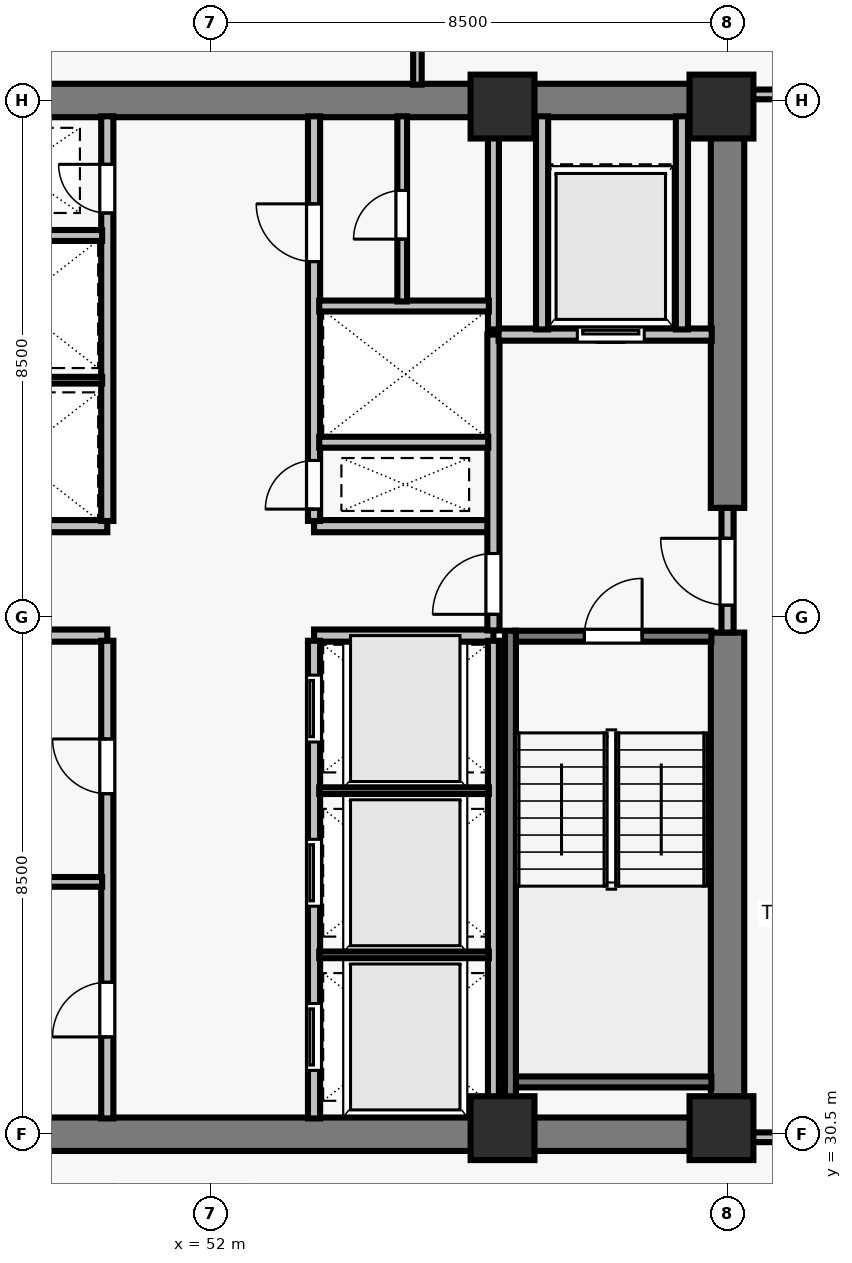
"""IFC4 building model, lengths in metres.
Left out: names, types, materials, properties, quantities, classifications, styles, units other than length and angle.
Written with IfcOpenShell. Run it as: python <this file> out.ifc"""

import sys

from ifc_helpers import new_model, si_unit, direction, frame, frame_2d, origin, origin_2d, place, context, subcontext, project, spatial, rectangle, extrude, element, fill, save


model = new_model("IFC4")
c1 = context("Model", 3, precision=1e-05, world=origin(), true_north=direction((0.0, 1.0)))
c2 = subcontext(c1, "Body", "Model", "MODEL_VIEW")
j1 = project(units=[si_unit("LENGTHUNIT", "METRE"), si_unit("PLANEANGLEUNIT", "RADIAN")], contexts=[c1])
p1 = place(None, origin())
s1 = spatial("IfcSite", under=j1, at=p1, CompositionType="ELEMENT")
p2 = place(p1, origin())
s2 = spatial("IfcBuilding", under=s1, at=p2, CompositionType="ELEMENT")
p3 = place(p2, frame((0.0, 0.0, 169.0)))
s3 = spatial("IfcBuildingStorey", under=s2, at=p3, CompositionType="ELEMENT", Elevation=169.0)
for number, where, z_axis, x_axis in (
    (1, (56.8, 30.6, 0.0), (0.0, 0.0, 1.0), (1.0, 0.0, 0.0)),
    (2, (60.4, 30.6, 0.0), (0.0, 0.0, 1.0), (1.0, 0.0, 0.0)),
    (3, (56.8, 47.4, 0.0), (0.0, 0.0, 1.0), (1.0, 0.0, 0.0)),
    (4, (60.4, 47.4, 0.0), (0.0, 0.0, 1.0), (1.0, 0.0, 0.0)),
):
    element("IfcColumn", number, at=place(p3, frame(where, z_axis=z_axis, x_axis=x_axis)), inside=s3, PredefinedType="COLUMN", context=c2, shape_type="SweptSolid", body=[
        extrude(rectangle(XDim=1.05, YDim=1.05, at=origin_2d()), origin(), (0.0, 0.0, 1.0), 3.5),
    ])
for number, where, z_axis, x_axis in (
    (5, (43.225, 30.5, 0.0), (0.0, 0.0, 1.0), (1.0, 0.0, 0.0)),
    (6, (43.225, 47.5, 0.0), (0.0, 0.0, 1.0), (1.0, 0.0, 0.0)),
):
    element("IfcWall", number, at=place(p3, frame(where, z_axis=z_axis, x_axis=x_axis)), inside=s3, PredefinedType="SHEAR", context=c2, shape_type="SweptSolid", body=[
        extrude(rectangle(XDim=17.55, YDim=0.55, at=frame_2d((8.775, 0.0))), origin(), (0.0, 0.0, 1.0), 3.28),
    ])
p4 = place(p3, frame((60.5, 30.765, 0.0), z_axis=(0.0, 0.0, 1.0), x_axis=(0.0, 1.0, 0.0)))
e7 = element("IfcWall", 7, at=p4, inside=s3, PredefinedType="SHEAR", context=c2, shape_type="SweptSolid", body=[
    extrude(rectangle(XDim=7.985, YDim=0.55, at=frame_2d((3.993, 0.0))), origin(), (0.0, 0.0, 1.0), 3.28),
])
p5 = place(p3, frame((60.5, 40.8, 0.0), z_axis=(0.0, 0.0, 1.0), x_axis=(0.0, 1.0, 0.0)))
e8 = element("IfcWall", 8, at=p5, inside=s3, PredefinedType="SHEAR", context=c2, shape_type="SweptSolid", body=[
    extrude(rectangle(XDim=6.435, YDim=0.55, at=frame_2d((3.218, 0.0))), origin(), (0.0, 0.0, 1.0), 3.28),
])
for number, where, z_axis, x_axis in (
    (9, (47.35, 38.7, 0.0), (0.0, 0.0, 1.0), (1.0, 0.0, 0.0)),
    (10, (47.35, 40.5, 0.0), (0.0, 0.0, 1.0), (1.0, 0.0, 0.0)),
    (11, (53.7, 38.7, 0.0), (0.0, 0.0, 1.0), (1.0, 0.0, 0.0)),
    (12, (53.7, 40.5, 0.0), (0.0, 0.0, 1.0), (1.0, 0.0, 0.0)),
):
    element("IfcWall", number, at=place(p3, frame(where, z_axis=z_axis, x_axis=x_axis)), inside=s3, PredefinedType="SOLIDWALL", context=c2, shape_type="SweptSolid", body=[
        extrude(rectangle(XDim=2.95, YDim=0.2, at=frame_2d((1.475, 0.0))), origin(), (0.0, 0.0, 1.0), 3.28),
    ])
p6 = place(p3, frame((50.3, 30.76, 0.0), z_axis=(0.0, 0.0, 1.0), x_axis=(0.0, 1.0, 0.0)))
e13 = element("IfcWall", 13, at=p6, inside=s3, PredefinedType="SOLIDWALL", context=c2, shape_type="SweptSolid", body=[
    extrude(rectangle(XDim=7.855, YDim=0.2, at=frame_2d((3.927, 0.0))), origin(), (0.0, 0.0, 1.0), 3.28),
])
p7 = place(p6, frame((1.34, 0.0, 0.0)))
e14 = element("IfcOpeningElement", 14, at=p7, cuts=e13, PredefinedType="OPENING", context=c2, shape_type="SweptSolid", body=[
    extrude(rectangle(XDim=0.9, YDim=2.12, at=frame_2d((0.45, 1.06))), frame((0.0, 0.11, 0.0), z_axis=(0.0, -1.0, 0.0), x_axis=(1.0, 0.0, 0.0)), (0.0, 0.0, 1.0), 0.22),
])
p8 = place(p6, frame((5.34, 0.0, 0.0)))
e15 = element("IfcOpeningElement", 15, at=p8, cuts=e13, PredefinedType="OPENING", context=c2, shape_type="SweptSolid", body=[
    extrude(rectangle(XDim=0.9, YDim=2.12, at=frame_2d((0.45, 1.06))), frame((0.0, 0.11, 0.0), z_axis=(0.0, -1.0, 0.0), x_axis=(1.0, 0.0, 0.0)), (0.0, 0.0, 1.0), 0.22),
])
p9 = place(p3, frame((53.7, 30.76, 0.0), z_axis=(0.0, 0.0, 1.0), x_axis=(0.0, 1.0, 0.0)))
e16 = element("IfcWall", 16, at=p9, inside=s3, PredefinedType="SOLIDWALL", context=c2, shape_type="SweptSolid", body=[
    extrude(rectangle(XDim=7.855, YDim=0.2, at=frame_2d((3.927, 0.0))), origin(), (0.0, 0.0, 1.0), 3.28),
])
p10 = place(p9, frame((0.79, 0.0, 0.0)))
e17 = element("IfcOpeningElement", 17, at=p10, cuts=e16, PredefinedType="OPENING", context=c2, shape_type="SweptSolid", body=[
    extrude(rectangle(XDim=1.1, YDim=2.2, at=frame_2d((0.55, 1.1))), frame((0.0, 0.11, 0.0), z_axis=(0.0, -1.0, 0.0), x_axis=(1.0, 0.0, 0.0)), (0.0, 0.0, 1.0), 0.22),
])
p11 = place(p9, frame((3.49, 0.0, 0.0)))
e18 = element("IfcOpeningElement", 18, at=p11, cuts=e16, PredefinedType="OPENING", context=c2, shape_type="SweptSolid", body=[
    extrude(rectangle(XDim=1.1, YDim=2.2, at=frame_2d((0.55, 1.1))), frame((0.0, 0.11, 0.0), z_axis=(0.0, -1.0, 0.0), x_axis=(1.0, 0.0, 0.0)), (0.0, 0.0, 1.0), 0.22),
])
p12 = place(p9, frame((6.19, 0.0, 0.0)))
e19 = element("IfcOpeningElement", 19, at=p12, cuts=e16, PredefinedType="OPENING", context=c2, shape_type="SweptSolid", body=[
    extrude(rectangle(XDim=1.1, YDim=2.2, at=frame_2d((0.55, 1.1))), frame((0.0, 0.11, 0.0), z_axis=(0.0, -1.0, 0.0), x_axis=(1.0, 0.0, 0.0)), (0.0, 0.0, 1.0), 0.22),
])
p13 = place(p3, frame((50.3, 40.585, 0.0), z_axis=(0.0, 0.0, 1.0), x_axis=(0.0, 1.0, 0.0)))
e20 = element("IfcWall", 20, at=p13, inside=s3, PredefinedType="SOLIDWALL", context=c2, shape_type="SweptSolid", body=[
    extrude(rectangle(XDim=6.655, YDim=0.2, at=frame_2d((3.328, 0.0))), origin(), (0.0, 0.0, 1.0), 3.28),
])
p14 = place(p13, frame((5.065, 0.0, 0.0)))
e21 = element("IfcOpeningElement", 21, at=p14, cuts=e20, PredefinedType="OPENING", context=c2, shape_type="SweptSolid", body=[
    extrude(rectangle(XDim=0.8, YDim=2.08, at=frame_2d((0.4, 1.04))), frame((0.0, 0.11, 0.0), z_axis=(0.0, -1.0, 0.0), x_axis=(1.0, 0.0, 0.0)), (0.0, 0.0, 1.0), 0.22),
])
p15 = place(p3, frame((53.7, 40.585, 0.0), z_axis=(0.0, 0.0, 1.0), x_axis=(0.0, 1.0, 0.0)))
e22 = element("IfcWall", 22, at=p15, inside=s3, PredefinedType="SOLIDWALL", context=c2, shape_type="SweptSolid", body=[
    extrude(rectangle(XDim=6.655, YDim=0.2, at=frame_2d((3.328, 0.0))), origin(), (0.0, 0.0, 1.0), 3.28),
])
p16 = place(p15, frame((0.195, 0.0, 0.0)))
e23 = element("IfcOpeningElement", 23, at=p16, cuts=e22, PredefinedType="OPENING", context=c2, shape_type="SweptSolid", body=[
    extrude(rectangle(XDim=0.8, YDim=2.08, at=frame_2d((0.4, 1.04))), frame((0.0, 0.11, 0.0), z_axis=(0.0, -1.0, 0.0), x_axis=(1.0, 0.0, 0.0)), (0.0, 0.0, 1.0), 0.22),
])
p17 = place(p15, frame((4.265, 0.0, 0.0)))
e24 = element("IfcOpeningElement", 24, at=p17, cuts=e22, PredefinedType="OPENING", context=c2, shape_type="SweptSolid", body=[
    extrude(rectangle(XDim=0.95, YDim=2.12, at=frame_2d((0.475, 1.06))), frame((0.0, 0.11, 0.0), z_axis=(0.0, -1.0, 0.0), x_axis=(1.0, 0.0, 0.0)), (0.0, 0.0, 1.0), 0.22),
])
p18 = place(p3, frame((60.5, 38.75, 0.0), z_axis=(0.0, 0.0, 1.0), x_axis=(0.0, 1.0, 0.0)))
e25 = element("IfcWall", 25, at=p18, inside=s3, PredefinedType="SOLIDWALL", context=c2, shape_type="SweptSolid", body=[
    extrude(rectangle(XDim=2.05, YDim=0.2, at=frame_2d((1.025, 0.0))), origin(), (0.0, 0.0, 1.0), 3.28),
])
p19 = place(p18, frame((0.45, 0.0, 0.0)))
e26 = element("IfcOpeningElement", 26, at=p19, cuts=e25, PredefinedType="OPENING", context=c2, shape_type="SweptSolid", body=[
    extrude(rectangle(XDim=1.1, YDim=2.15, at=frame_2d((0.55, 1.075))), frame((0.0, 0.11, 0.0), z_axis=(0.0, -1.0, 0.0), x_axis=(1.0, 0.0, 0.0)), (0.0, 0.0, 1.0), 0.22),
])
p20 = place(p3, frame((56.65, 38.785, 0.0), z_axis=(0.0, 0.0, 1.0), x_axis=(0.0, 1.0, 0.0)))
e27 = element("IfcWall", 27, at=p20, inside=s3, PredefinedType="SOLIDWALL", context=c2, shape_type="SweptSolid", body=[
    extrude(rectangle(XDim=4.865, YDim=0.2, at=frame_2d((2.433, 0.0))), origin(), (0.0, 0.0, 1.0), 3.28),
])
p21 = place(p20, frame((0.265, 0.0, 0.0)))
e28 = element("IfcOpeningElement", 28, at=p21, cuts=e27, PredefinedType="OPENING", context=c2, shape_type="SweptSolid", body=[
    extrude(rectangle(XDim=1.0, YDim=2.15, at=frame_2d((0.5, 1.075))), frame((0.0, 0.11, 0.0), z_axis=(0.0, -1.0, 0.0), x_axis=(1.0, 0.0, 0.0)), (0.0, 0.0, 1.0), 0.22),
])
p22 = place(p3, frame((56.735, 43.65, 0.0), z_axis=(0.0, 0.0, 1.0), x_axis=(1.0, 0.0, 0.0)))
e29 = element("IfcWall", 29, at=p22, inside=s3, PredefinedType="SOLIDWALL", context=c2, shape_type="SweptSolid", body=[
    extrude(rectangle(XDim=3.505, YDim=0.2, at=frame_2d((1.752, 0.0))), origin(), (0.0, 0.0, 1.0), 3.28),
])
p23 = place(p22, frame((1.295, 0.0, 0.0)))
e30 = element("IfcOpeningElement", 30, at=p23, cuts=e29, PredefinedType="OPENING", context=c2, shape_type="SweptSolid", body=[
    extrude(rectangle(XDim=1.1, YDim=2.2, at=frame_2d((0.55, 1.1))), frame((0.0, 0.11, 0.0), z_axis=(0.0, -1.0, 0.0), x_axis=(1.0, 0.0, 0.0)), (0.0, 0.0, 1.0), 0.22),
])
for number, where, z_axis, x_axis in (
    (31, (57.45, 43.735, 0.0), (0.0, 0.0, 1.0), (0.0, 1.0, 0.0)),
    (32, (59.75, 43.735, 0.0), (0.0, 0.0, 1.0), (0.0, 1.0, 0.0)),
):
    element("IfcWall", number, at=place(p3, frame(where, z_axis=z_axis, x_axis=x_axis)), inside=s3, PredefinedType="SOLIDWALL", context=c2, shape_type="SweptSolid", body=[
        extrude(rectangle(XDim=3.505, YDim=0.2, at=frame_2d((1.752, 0.0))), origin(), (0.0, 0.0, 1.0), 3.28),
    ])
p24 = place(p3, frame((47.415, 34.65, 0.0), z_axis=(0.0, 0.0, 1.0), x_axis=(1.0, 0.0, 0.0)))
e33 = element("IfcWall", 33, at=p24, inside=s3, PredefinedType="PARTITIONING", context=c2, shape_type="SweptSolid", body=[
    extrude(rectangle(XDim=2.8, YDim=0.16, at=frame_2d((1.4, 0.0))), origin(), (0.0, 0.0, 1.0), 3.28),
])
p25 = place(p3, frame((56.65, 30.76, 0.0), z_axis=(0.0, 0.0, 1.0), x_axis=(0.0, 1.0, 0.0)))
e34 = element("IfcWall", 34, at=p25, inside=s3, PredefinedType="SOLIDWALL", context=c2, shape_type="SweptSolid", body=[
    extrude(rectangle(XDim=7.855, YDim=0.18, at=frame_2d((3.927, 0.0))), origin(), (0.0, 0.0, 1.0), 3.28),
])
for number, where, z_axis, x_axis in (
    (35, (53.785, 33.45, 0.0), (0.0, 0.0, 1.0), (1.0, 0.0, 0.0)),
    (36, (53.785, 36.15, 0.0), (0.0, 0.0, 1.0), (1.0, 0.0, 0.0)),
):
    element("IfcWall", number, at=place(p3, frame(where, z_axis=z_axis, x_axis=x_axis)), inside=s3, PredefinedType="PARTITIONING", context=c2, shape_type="SweptSolid", body=[
        extrude(rectangle(XDim=2.79, YDim=0.11, at=frame_2d((1.395, 0.0))), origin(), (0.0, 0.0, 1.0), 3.28),
    ])
p26 = place(p3, frame((47.435, 42.9, 0.0), z_axis=(0.0, 0.0, 1.0), x_axis=(1.0, 0.0, 0.0)))
e37 = element("IfcWall", 37, at=p26, inside=s3, PredefinedType="PARTITIONING", context=c2, shape_type="SweptSolid", body=[
    extrude(rectangle(XDim=2.78, YDim=0.11, at=frame_2d((1.39, 0.0))), origin(), (0.0, 0.0, 1.0), 3.28),
])
p27 = place(p3, frame((47.425, 45.28, 0.0), z_axis=(0.0, 0.0, 1.0), x_axis=(1.0, 0.0, 0.0)))
e38 = element("IfcWall", 38, at=p27, inside=s3, PredefinedType="SOLIDWALL", context=c2, shape_type="SweptSolid", body=[
    extrude(rectangle(XDim=2.79, YDim=0.18, at=frame_2d((1.395, 0.0))), origin(), (0.0, 0.0, 1.0), 3.28),
])
p28 = place(p3, frame((56.65, 43.735, 0.0), z_axis=(0.0, 0.0, 1.0), x_axis=(0.0, 1.0, 0.0)))
e39 = element("IfcWall", 39, at=p28, inside=s3, PredefinedType="SOLIDWALL", context=c2, shape_type="SweptSolid", body=[
    extrude(rectangle(XDim=3.505, YDim=0.18, at=frame_2d((1.752, 0.0))), origin(), (0.0, 0.0, 1.0), 3.28),
])
p29 = place(p3, frame((53.785, 41.88, 0.0), z_axis=(0.0, 0.0, 1.0), x_axis=(1.0, 0.0, 0.0)))
e40 = element("IfcWall", 40, at=p29, inside=s3, PredefinedType="SOLIDWALL", context=c2, shape_type="SweptSolid", body=[
    extrude(rectangle(XDim=2.78, YDim=0.18, at=frame_2d((1.39, 0.0))), origin(), (0.0, 0.0, 1.0), 3.28),
])
p30 = place(p3, frame((53.785, 44.12, 0.0), z_axis=(0.0, 0.0, 1.0), x_axis=(1.0, 0.0, 0.0)))
e41 = element("IfcWall", 41, at=p30, inside=s3, PredefinedType="SOLIDWALL", context=c2, shape_type="SweptSolid", body=[
    extrude(rectangle(XDim=2.79, YDim=0.18, at=frame_2d((1.395, 0.0))), origin(), (0.0, 0.0, 1.0), 3.28),
])
p31 = place(p3, frame((55.15, 44.195, 0.0), z_axis=(0.0, 0.0, 1.0), x_axis=(0.0, 1.0, 0.0)))
e42 = element("IfcWall", 42, at=p31, inside=s3, PredefinedType="PARTITIONING", context=c2, shape_type="SweptSolid", body=[
    extrude(rectangle(XDim=3.045, YDim=0.16, at=frame_2d((1.522, 0.0))), origin(), (0.0, 0.0, 1.0), 3.28),
])
p32 = place(p31, frame((1.025, 0.0, 0.0)))
e43 = element("IfcOpeningElement", 43, at=p32, cuts=e42, PredefinedType="OPENING", context=c2, shape_type="SweptSolid", body=[
    extrude(rectangle(XDim=0.8, YDim=2.1, at=frame_2d((0.4, 1.05))), frame((0.0, 0.09, 0.0), z_axis=(0.0, -1.0, 0.0), x_axis=(1.0, 0.0, 0.0)), (0.0, 0.0, 1.0), 0.18),
])
p33 = place(p3, frame((60.765, 30.45, 0.0), z_axis=(0.0, 0.0, 1.0), x_axis=(1.0, 0.0, 0.0)))
e44 = element("IfcWall", 44, at=p33, inside=s3, PredefinedType="PARTITIONING", context=c2, shape_type="SweptSolid", body=[
    extrude(rectangle(XDim=3.235, YDim=0.16, at=frame_2d((1.618, 0.0))), origin(), (0.0, 0.0, 1.0), 3.28),
])
p34 = place(p3, frame((60.765, 47.6, 0.0), z_axis=(0.0, 0.0, 1.0), x_axis=(1.0, 0.0, 0.0)))
e45 = element("IfcWall", 45, at=p34, inside=s3, PredefinedType="PARTITIONING", context=c2, shape_type="SweptSolid", body=[
    extrude(rectangle(XDim=3.17, YDim=0.16, at=frame_2d((1.585, 0.0))), origin(), (0.0, 0.0, 1.0), 3.28),
])
p35 = place(p3, frame((55.4, 47.76, 0.0), z_axis=(0.0, 0.0, 1.0), x_axis=(0.0, 1.0, 0.0)))
e46 = element("IfcWall", 46, at=p35, inside=s3, PredefinedType="PARTITIONING", context=c2, shape_type="SweptSolid", body=[
    extrude(rectangle(XDim=14.915, YDim=0.14, at=frame_2d((7.458, 0.0))), origin(), (0.0, 0.0, 1.0), 2.896),
])
p36 = place(p3, frame((57.005, 38.69, 0.0), z_axis=(0.0, 0.0, 1.0), x_axis=(1.0, 0.0, 0.0)))
e47 = element("IfcWall", 47, at=p36, inside=s3, PredefinedType="SOLIDWALL", context=c2, shape_type="SweptSolid", body=[
    extrude(rectangle(XDim=3.23, YDim=0.18, at=frame_2d((1.615, 0.0))), origin(), (0.0, 0.0, 1.0), 3.28),
])
p37 = place(p36, frame((1.14, 0.0, 0.0)))
e48 = element("IfcOpeningElement", 48, at=p37, cuts=e47, PredefinedType="OPENING", context=c2, shape_type="SweptSolid", body=[
    extrude(rectangle(XDim=0.95, YDim=2.15, at=frame_2d((0.475, 1.075))), frame((0.0, 0.1, 0.0), z_axis=(0.0, -1.0, 0.0), x_axis=(1.0, 0.0, 0.0)), (0.0, 0.0, 1.0), 0.2),
])
p38 = place(p3, frame((57.005, 31.36, 0.0), z_axis=(0.0, 0.0, 1.0), x_axis=(1.0, 0.0, 0.0)))
e49 = element("IfcWall", 49, at=p38, inside=s3, PredefinedType="SOLIDWALL", context=c2, shape_type="SweptSolid", body=[
    extrude(rectangle(XDim=3.23, YDim=0.18, at=frame_2d((1.615, 0.0))), origin(), (0.0, 0.0, 1.0), 3.28),
])
p39 = place(p3, frame((56.93, 38.78, 0.0), z_axis=(0.0, 0.0, 1.0), x_axis=(0.0, -1.0, 0.0)))
e50 = element("IfcWall", 50, at=p39, inside=s3, PredefinedType="SOLIDWALL", context=c2, shape_type="SweptSolid", body=[
    extrude(rectangle(XDim=8.017, YDim=0.18, at=frame_2d((4.009, 0.0))), origin(), (0.0, 0.0, 1.0), 3.28),
])
p40 = place(p19, origin())
e51 = element("IfcDoor", 51, at=p40, inside=s3, OperationType="SINGLE_SWING_RIGHT", PredefinedType="DOOR", context=c2, shape_type="SweptSolid", body=[
    extrude(rectangle(XDim=1.1, YDim=2.15, at=frame_2d((0.55, 1.075))), frame((0.0, 0.025, 0.0), z_axis=(0.0, -1.0, 0.0), x_axis=(1.0, 0.0, 0.0)), (0.0, 0.0, 1.0), 0.05),
])
fill(e26, e51)
p41 = place(p21, origin())
e52 = element("IfcDoor", 52, at=p41, inside=s3, OperationType="SINGLE_SWING_LEFT", PredefinedType="DOOR", context=c2, shape_type="SweptSolid", body=[
    extrude(rectangle(XDim=1.0, YDim=2.15, at=frame_2d((0.5, 1.075))), frame((0.0, 0.025, 0.0), z_axis=(0.0, -1.0, 0.0), x_axis=(1.0, 0.0, 0.0)), (0.0, 0.0, 1.0), 0.05),
])
fill(e28, e52)
p42 = place(p23, origin())
e53 = element("IfcDoor", 53, at=p42, inside=s3, OperationType="SLIDING_TO_LEFT", PredefinedType="DOOR", context=c2, shape_type="SweptSolid", body=[
    extrude(rectangle(XDim=1.1, YDim=2.2, at=frame_2d((0.55, 1.1))), frame((0.0, 0.025, 0.0), z_axis=(0.0, -1.0, 0.0), x_axis=(1.0, 0.0, 0.0)), (0.0, 0.0, 1.0), 0.05),
])
fill(e30, e53)
p43 = place(p7, origin())
e54 = element("IfcDoor", 54, at=p43, inside=s3, OperationType="SINGLE_SWING_LEFT", PredefinedType="DOOR", context=c2, shape_type="SweptSolid", body=[
    extrude(rectangle(XDim=0.9, YDim=2.12, at=frame_2d((0.45, 1.06))), frame((0.0, 0.025, 0.0), z_axis=(0.0, -1.0, 0.0), x_axis=(1.0, 0.0, 0.0)), (0.0, 0.0, 1.0), 0.05),
])
fill(e14, e54)
p44 = place(p8, origin())
e55 = element("IfcDoor", 55, at=p44, inside=s3, OperationType="SINGLE_SWING_RIGHT", PredefinedType="DOOR", context=c2, shape_type="SweptSolid", body=[
    extrude(rectangle(XDim=0.9, YDim=2.12, at=frame_2d((0.45, 1.06))), frame((0.0, 0.025, 0.0), z_axis=(0.0, -1.0, 0.0), x_axis=(1.0, 0.0, 0.0)), (0.0, 0.0, 1.0), 0.05),
])
fill(e15, e55)
p45 = place(p10, origin())
e56 = element("IfcDoor", 56, at=p45, inside=s3, OperationType="SLIDING_TO_LEFT", PredefinedType="DOOR", context=c2, shape_type="SweptSolid", body=[
    extrude(rectangle(XDim=1.1, YDim=2.2, at=frame_2d((0.55, 1.1))), frame((0.0, 0.025, 0.0), z_axis=(0.0, -1.0, 0.0), x_axis=(1.0, 0.0, 0.0)), (0.0, 0.0, 1.0), 0.05),
])
fill(e17, e56)
p46 = place(p11, origin())
e57 = element("IfcDoor", 57, at=p46, inside=s3, OperationType="SLIDING_TO_LEFT", PredefinedType="DOOR", context=c2, shape_type="SweptSolid", body=[
    extrude(rectangle(XDim=1.1, YDim=2.2, at=frame_2d((0.55, 1.1))), frame((0.0, 0.025, 0.0), z_axis=(0.0, -1.0, 0.0), x_axis=(1.0, 0.0, 0.0)), (0.0, 0.0, 1.0), 0.05),
])
fill(e18, e57)
p47 = place(p12, origin())
e58 = element("IfcDoor", 58, at=p47, inside=s3, OperationType="SLIDING_TO_LEFT", PredefinedType="DOOR", context=c2, shape_type="SweptSolid", body=[
    extrude(rectangle(XDim=1.1, YDim=2.2, at=frame_2d((0.55, 1.1))), frame((0.0, 0.025, 0.0), z_axis=(0.0, -1.0, 0.0), x_axis=(1.0, 0.0, 0.0)), (0.0, 0.0, 1.0), 0.05),
])
fill(e19, e58)
p48 = place(p14, origin())
e59 = element("IfcDoor", 59, at=p48, inside=s3, OperationType="SINGLE_SWING_RIGHT", PredefinedType="DOOR", context=c2, shape_type="SweptSolid", body=[
    extrude(rectangle(XDim=0.8, YDim=2.08, at=frame_2d((0.4, 1.04))), frame((0.0, 0.025, 0.0), z_axis=(0.0, -1.0, 0.0), x_axis=(1.0, 0.0, 0.0)), (0.0, 0.0, 1.0), 0.05),
])
fill(e21, e59)
p49 = place(p16, origin())
e60 = element("IfcDoor", 60, at=p49, inside=s3, OperationType="SINGLE_SWING_LEFT", PredefinedType="DOOR", context=c2, shape_type="SweptSolid", body=[
    extrude(rectangle(XDim=0.8, YDim=2.08, at=frame_2d((0.4, 1.04))), frame((0.0, 0.025, 0.0), z_axis=(0.0, -1.0, 0.0), x_axis=(1.0, 0.0, 0.0)), (0.0, 0.0, 1.0), 0.05),
])
fill(e23, e60)
p50 = place(p17, origin())
e61 = element("IfcDoor", 61, at=p50, inside=s3, OperationType="SINGLE_SWING_RIGHT", PredefinedType="DOOR", context=c2, shape_type="SweptSolid", body=[
    extrude(rectangle(XDim=0.95, YDim=2.12, at=frame_2d((0.475, 1.06))), frame((0.0, 0.025, 0.0), z_axis=(0.0, -1.0, 0.0), x_axis=(1.0, 0.0, 0.0)), (0.0, 0.0, 1.0), 0.05),
])
fill(e24, e61)
p51 = place(p32, origin())
e62 = element("IfcDoor", 62, at=p51, inside=s3, OperationType="SINGLE_SWING_LEFT", PredefinedType="DOOR", context=c2, shape_type="SweptSolid", body=[
    extrude(rectangle(XDim=0.8, YDim=2.1, at=frame_2d((0.4, 1.05))), frame((0.0, 0.025, 0.0), z_axis=(0.0, -1.0, 0.0), x_axis=(1.0, 0.0, 0.0)), (0.0, 0.0, 1.0), 0.05),
])
fill(e43, e62)
p52 = place(p37, origin())
e63 = element("IfcDoor", 63, at=p52, inside=s3, OperationType="SINGLE_SWING_RIGHT", PredefinedType="DOOR", context=c2, shape_type="SweptSolid", body=[
    extrude(rectangle(XDim=0.95, YDim=2.15, at=frame_2d((0.475, 1.075))), frame((0.0, 0.025, 0.0), z_axis=(0.0, -1.0, 0.0), x_axis=(1.0, 0.0, 0.0)), (0.0, 0.0, 1.0), 0.05),
])
fill(e48, e63)
save(model, sys.argv[1])
